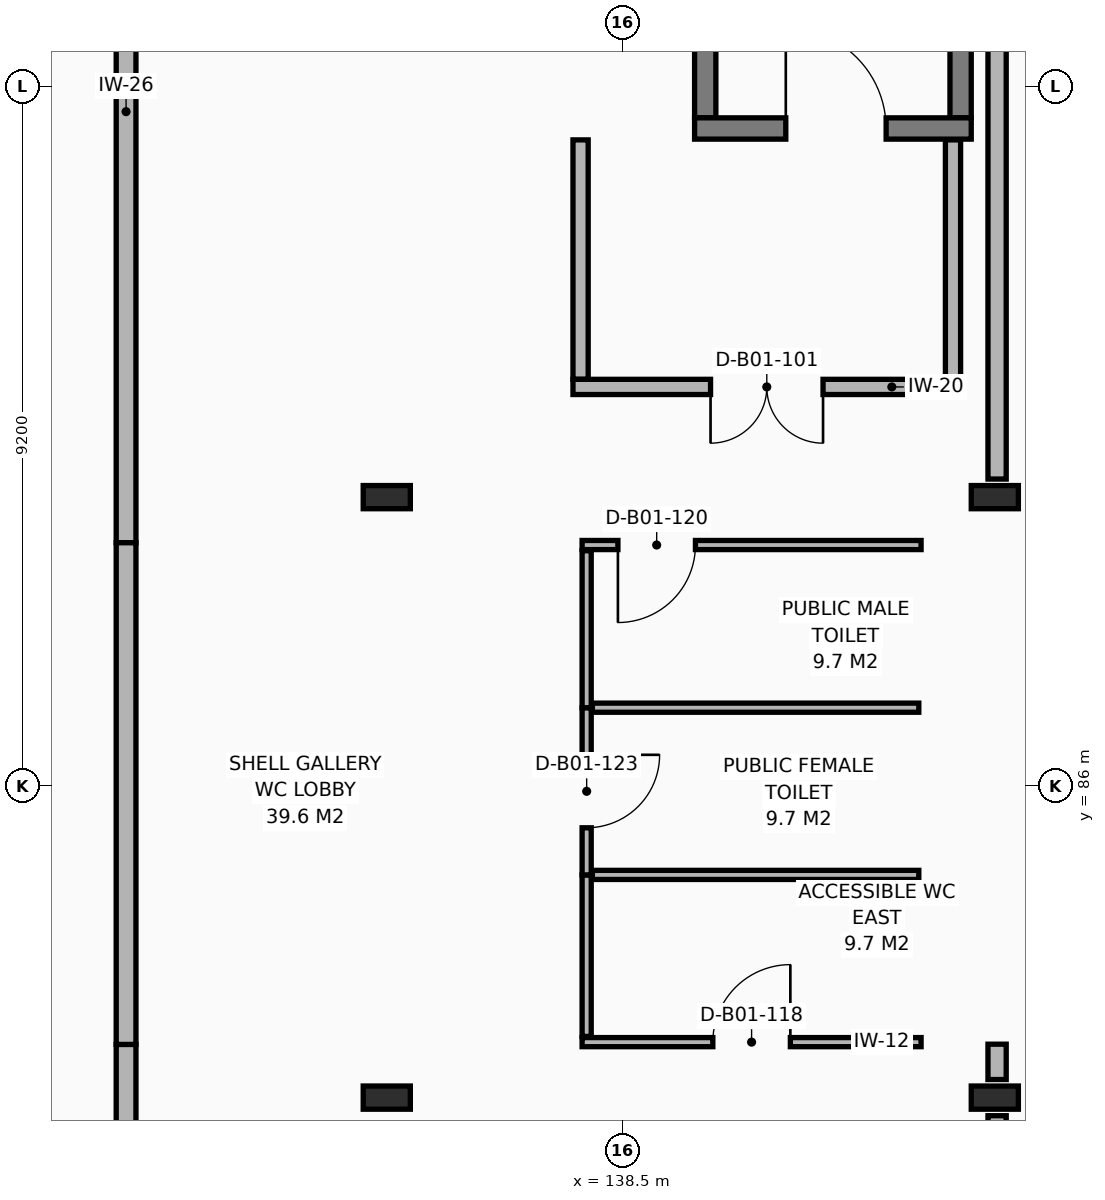
"""IFC4 building model, lengths in metres.
Left out: names, types, materials, properties, quantities, classifications, styles, units other than length and angle.
Written with IfcOpenShell. Run it as: python <this file> out.ifc"""

import sys

from ifc_helpers import new_model, si_unit, direction, frame, frame_2d, origin, origin_2d, place, context, subcontext, project, spatial, rectangle, i_section, extrude, element, fill, save


model = new_model("IFC4")
c1 = context("Model", 3, precision=1e-05, world=origin(), true_north=direction((0.0, 1.0)))
c2 = subcontext(c1, "Body", "Model", "MODEL_VIEW")
j1 = project(units=[si_unit("LENGTHUNIT", "METRE"), si_unit("PLANEANGLEUNIT", "RADIAN")], contexts=[c1])
p1 = place(None, origin())
s1 = spatial("IfcSite", under=j1, at=p1, CompositionType="ELEMENT")
p2 = place(p1, origin())
s2 = spatial("IfcBuilding", under=s1, at=p2, CompositionType="ELEMENT")
p3 = place(p2, frame((0.0, 0.0, -4.8)))
s3 = spatial("IfcBuildingStorey", under=s2, at=p3, CompositionType="ELEMENT", Elevation=-4.8)
for number, where, z_axis, x_axis in (
    (1, (135.4, 81.9, 0.0), (0.0, 0.0, 1.0), (1.0, 0.0, 0.0)),
    (2, (135.4, 89.8, 0.0), (0.0, 0.0, 1.0), (1.0, 0.0, 0.0)),
    (3, (143.4, 81.9, 0.0), (0.0, 0.0, 1.0), (1.0, 0.0, 0.0)),
    (4, (143.4, 89.8, 0.0), (0.0, 0.0, 1.0), (1.0, 0.0, 0.0)),
):
    element("IfcColumn", number, at=place(p3, frame(where, z_axis=z_axis, x_axis=x_axis)), inside=s3, PredefinedType="COLUMN", context=c2, shape_type="SweptSolid", body=[
        extrude(i_section(OverallWidth=0.305, OverallDepth=0.62, WebThickness=0.021, FlangeThickness=0.04, FilletRadius=0.027, at=origin_2d()), origin(), (0.0, 0.0, 1.0), 4.8),
    ])
for number, where, z_axis, x_axis in (
    (5, (142.95, 94.79, 0.0), (0.0, 0.0, 1.0), (0.0, 1.0, 0.0)),
    (6, (139.59, 102.49, 0.0), (0.0, 0.0, 1.0), (0.0, -1.0, 0.0)),
):
    element("IfcWall", number, at=place(p3, frame(where, z_axis=z_axis, x_axis=x_axis)), inside=s3, PredefinedType="SHEAR", context=c2, shape_type="SweptSolid", body=[
        extrude(rectangle(XDim=7.7, YDim=0.28, at=frame_2d((3.85, 0.0))), origin(), (0.0, 0.0, 1.0), 4.55),
    ])
p4 = place(p3, frame((139.45, 94.65, 0.0), z_axis=(0.0, 0.0, 1.0), x_axis=(1.0, 0.0, 0.0)))
e7 = element("IfcWall", 7, at=p4, inside=s3, PredefinedType="SHEAR", context=c2, shape_type="SweptSolid", body=[
    extrude(rectangle(XDim=3.64, YDim=0.28, at=frame_2d((1.82, 0.0))), origin(), (0.0, 0.0, 1.0), 4.55),
])
p5 = place(p4, frame((1.2, 0.0, 0.0)))
e8 = element("IfcOpeningElement", 8, at=p5, cuts=e7, PredefinedType="OPENING", context=c2, shape_type="SweptSolid", body=[
    extrude(rectangle(XDim=1.32, YDim=2.12, at=frame_2d((0.66, 1.06))), frame((0.0, 0.15, 0.0), z_axis=(0.0, -1.0, 0.0), x_axis=(1.0, 0.0, 0.0)), (0.0, 0.0, 1.0), 0.3),
])
for number, where, z_axis, x_axis in (
    (9, (142.85, 91.35, 0.0), (0.0, 0.0, 1.0), (0.0, 1.0, 0.0)),
    (10, (137.95, 94.5, 0.0), (0.0, 0.0, 1.0), (0.0, -1.0, 0.0)),
):
    element("IfcWall", number, at=place(p3, frame(where, z_axis=z_axis, x_axis=x_axis)), inside=s3, PredefinedType="PARTITIONING", context=c2, shape_type="SweptSolid", body=[
        extrude(rectangle(XDim=3.15, YDim=0.2, at=frame_2d((1.575, 0.0))), origin(), (0.0, 0.0, 1.0), 4.55),
    ])
p6 = place(p3, frame((142.95, 91.25, 0.0), z_axis=(0.0, 0.0, 1.0), x_axis=(-1.0, 0.0, 0.0)))
e11 = element("IfcWall", 11, at=p6, inside=s3, PredefinedType="PARTITIONING", context=c2, shape_type="SweptSolid", body=[
    extrude(rectangle(XDim=5.1, YDim=0.2, at=frame_2d((2.55, 0.0))), origin(), (0.0, 0.0, 1.0), 4.55),
])
p7 = place(p6, frame((1.81, 0.0, 0.0)))
e12 = element("IfcOpeningElement", 12, at=p7, cuts=e11, PredefinedType="OPENING", context=c2, shape_type="SweptSolid", body=[
    extrude(rectangle(XDim=1.48, YDim=2.15, at=frame_2d((0.74, 1.075))), frame((0.0, 0.11, 0.0), z_axis=(0.0, -1.0, 0.0), x_axis=(1.0, 0.0, 0.0)), (0.0, 0.0, 1.0), 0.22),
])
p8 = place(p3, frame((137.97, 82.63, 0.0), z_axis=(0.0, 0.0, 1.0), x_axis=(1.0, 0.0, 0.0)))
e13 = element("IfcWall", 13, at=p8, inside=s3, PredefinedType="PARTITIONING", context=c2, shape_type="SweptSolid", body=[
    extrude(rectangle(XDim=4.46, YDim=0.12, at=frame_2d((2.23, 0.0))), origin(), (0.0, 0.0, 1.0), 4.54),
])
p9 = place(p8, frame((1.72, 0.0, 0.0)))
e14 = element("IfcOpeningElement", 14, at=p9, cuts=e13, PredefinedType="OPENING", context=c2, shape_type="SweptSolid", body=[
    extrude(rectangle(XDim=1.02, YDim=2.12, at=frame_2d((0.51, 1.06))), frame((0.0, 0.07, 0.0), z_axis=(0.0, -1.0, 0.0), x_axis=(1.0, 0.0, 0.0)), (0.0, 0.0, 1.0), 0.14),
])
p10 = place(p3, frame((131.97, 73.675, 0.0), z_axis=(0.0, 0.0, 1.0), x_axis=(0.0, 1.0, 0.0)))
e15 = element("IfcWall", 15, at=p10, inside=s3, PredefinedType="PARTITIONING", context=c2, shape_type="SweptSolid", body=[
    extrude(rectangle(XDim=8.925, YDim=0.26, at=frame_2d((4.462, 0.0))), origin(), (0.0, 0.0, 1.0), 3.53),
])
p11 = place(p3, frame((143.43, 81.662, 0.0), z_axis=(0.0, 0.0, 1.0), x_axis=(0.0, -1.0, 0.0)))
e16 = element("IfcWall", 16, at=p11, inside=s3, PredefinedType="PARTITIONING", context=c2, shape_type="SweptSolid", body=[
    extrude(rectangle(XDim=1.132, YDim=0.24, at=frame_2d((0.566, 0.0))), origin(), (0.0, 0.0, 1.0), 3.53),
])
p12 = place(p3, frame((143.43, 82.603, 0.0), z_axis=(0.0, 0.0, 1.0), x_axis=(0.0, -1.0, 0.0)))
e17 = element("IfcWall", 17, at=p12, inside=s3, PredefinedType="PARTITIONING", context=c2, shape_type="SweptSolid", body=[
    extrude(rectangle(XDim=0.465, YDim=0.24, at=frame_2d((0.232, 0.0))), origin(), (0.0, 0.0, 1.0), 3.53),
])
p13 = place(p3, frame((142.43, 89.17, 0.0), z_axis=(0.0, 0.0, 1.0), x_axis=(-1.0, 0.0, 0.0)))
e18 = element("IfcWall", 18, at=p13, inside=s3, PredefinedType="PARTITIONING", context=c2, shape_type="SweptSolid", body=[
    extrude(rectangle(XDim=4.46, YDim=0.12, at=frame_2d((2.23, 0.0))), origin(), (0.0, 0.0, 1.0), 4.54),
])
p14 = place(p13, frame((2.969, 0.0, 0.0)))
e19 = element("IfcOpeningElement", 19, at=p14, cuts=e18, PredefinedType="OPENING", context=c2, shape_type="SweptSolid", body=[
    extrude(rectangle(XDim=1.02, YDim=2.12, at=frame_2d((0.51, 1.06))), frame((0.0, 0.07, 0.0), z_axis=(0.0, -1.0, 0.0), x_axis=(1.0, 0.0, 0.0)), (0.0, 0.0, 1.0), 0.14),
])
p15 = place(p3, frame((131.97, 89.2, 0.0), z_axis=(0.0, 0.0, 1.0), x_axis=(0.0, 1.0, 0.0)))
e20 = element("IfcWall", 20, at=p15, inside=s3, PredefinedType="PARTITIONING", context=c2, shape_type="SweptSolid", body=[
    extrude(rectangle(XDim=23.836, YDim=0.26, at=frame_2d((11.918, 0.0))), origin(), (0.0, 0.0, 1.0), 3.53),
])
p16 = place(p15, frame((11.343, 0.0, 0.0)))
e21 = element("IfcOpeningElement", 21, at=p16, cuts=e20, PredefinedType="OPENING", context=c2, shape_type="SweptSolid", body=[
    extrude(rectangle(XDim=1.15, YDim=2.15, at=frame_2d((0.575, 1.075))), frame((0.0, 0.14, 0.0), z_axis=(0.0, -1.0, 0.0), x_axis=(1.0, 0.0, 0.0)), (0.0, 0.0, 1.0), 0.28),
])
p17 = place(p3, frame((143.43, 96.53, 0.0), z_axis=(0.0, 0.0, 1.0), x_axis=(0.0, -1.0, 0.0)))
e22 = element("IfcWall", 22, at=p17, inside=s3, PredefinedType="PARTITIONING", context=c2, shape_type="SweptSolid", body=[
    extrude(rectangle(XDim=6.492, YDim=0.24, at=frame_2d((3.246, 0.0))), origin(), (0.0, 0.0, 1.0), 3.53),
])
p18 = place(p3, frame((138.03, 84.83, 0.0), z_axis=(0.0, 0.0, 1.0), x_axis=(0.0, -1.0, 0.0)))
e23 = element("IfcWall", 23, at=p18, inside=s3, PredefinedType="PARTITIONING", context=c2, shape_type="SweptSolid", body=[
    extrude(rectangle(XDim=2.125, YDim=0.12, at=frame_2d((1.062, 0.0))), origin(), (0.0, 0.0, 1.0), 4.54),
])
p19 = place(p3, frame((138.03, 87.03, 0.0), z_axis=(0.0, 0.0, 1.0), x_axis=(0.0, -1.0, 0.0)))
e24 = element("IfcWall", 24, at=p19, inside=s3, PredefinedType="PARTITIONING", context=c2, shape_type="SweptSolid", body=[
    extrude(rectangle(XDim=2.2, YDim=0.12, at=frame_2d((1.1, 0.0))), origin(), (0.0, 0.0, 1.0), 4.54),
])
p20 = place(p19, frame((0.62, 0.0, 0.0)))
e25 = element("IfcOpeningElement", 25, at=p20, cuts=e24, PredefinedType="OPENING", context=c2, shape_type="SweptSolid", body=[
    extrude(rectangle(XDim=0.96, YDim=2.1, at=frame_2d((0.48, 1.05))), frame((0.0, 0.07, 0.0), z_axis=(0.0, -1.0, 0.0), x_axis=(1.0, 0.0, 0.0)), (0.0, 0.0, 1.0), 0.14),
])
p21 = place(p3, frame((138.03, 89.095, 0.0), z_axis=(0.0, 0.0, 1.0), x_axis=(0.0, -1.0, 0.0)))
e26 = element("IfcWall", 26, at=p21, inside=s3, PredefinedType="PARTITIONING", context=c2, shape_type="SweptSolid", body=[
    extrude(rectangle(XDim=2.065, YDim=0.12, at=frame_2d((1.032, 0.0))), origin(), (0.0, 0.0, 1.0), 4.54),
])
p22 = place(p3, frame((131.97, 82.6, 0.0), z_axis=(0.0, 0.0, 1.0), x_axis=(0.0, 1.0, 0.0)))
e27 = element("IfcWall", 27, at=p22, inside=s3, PredefinedType="PARTITIONING", context=c2, shape_type="SweptSolid", body=[
    extrude(rectangle(XDim=6.6, YDim=0.26, at=frame_2d((3.3, 0.0))), origin(), (0.0, 0.0, 1.0), 3.98),
])
for number, where, z_axis, x_axis in (
    (28, (138.105, 84.83, 0.0), (0.0, 0.0, 1.0), (1.0, 0.0, 0.0)),
    (29, (138.105, 87.03, 0.0), (0.0, 0.0, 1.0), (1.0, 0.0, 0.0)),
):
    element("IfcWall", number, at=place(p3, frame(where, z_axis=z_axis, x_axis=x_axis)), inside=s3, PredefinedType="PARTITIONING", context=c2, shape_type="SweptSolid", body=[
        extrude(rectangle(XDim=4.295, YDim=0.12, at=frame_2d((2.147, 0.0))), origin(), (0.0, 0.0, 1.0), 4.54),
    ])
p23 = place(p5, origin())
e30 = element("IfcDoor", 30, at=p23, inside=s3, OperationType="SINGLE_SWING_LEFT", PredefinedType="DOOR", context=c2, shape_type="SweptSolid", body=[
    extrude(rectangle(XDim=1.32, YDim=2.12, at=frame_2d((0.66, 1.06))), frame((0.0, 0.025, 0.0), z_axis=(0.0, -1.0, 0.0), x_axis=(1.0, 0.0, 0.0)), (0.0, 0.0, 1.0), 0.05),
])
fill(e8, e30)
p24 = place(p7, origin())
e31 = element("IfcDoor", 31, at=p24, inside=s3, OperationType="DOUBLE_DOOR_SINGLE_SWING", PredefinedType="DOOR", context=c2, shape_type="SweptSolid", body=[
    extrude(rectangle(XDim=1.48, YDim=2.15, at=frame_2d((0.74, 1.075))), frame((0.0, 0.025, 0.0), z_axis=(0.0, -1.0, 0.0), x_axis=(1.0, 0.0, 0.0)), (0.0, 0.0, 1.0), 0.05),
])
fill(e12, e31)
p25 = place(p9, origin())
e32 = element("IfcDoor", 32, at=p25, inside=s3, OperationType="SINGLE_SWING_RIGHT", PredefinedType="DOOR", context=c2, shape_type="SweptSolid", body=[
    extrude(rectangle(XDim=1.02, YDim=2.12, at=frame_2d((0.51, 1.06))), frame((0.0, 0.025, 0.0), z_axis=(0.0, -1.0, 0.0), x_axis=(1.0, 0.0, 0.0)), (0.0, 0.0, 1.0), 0.05),
])
fill(e14, e32)
p26 = place(p14, origin())
e33 = element("IfcDoor", 33, at=p26, inside=s3, OperationType="SINGLE_SWING_RIGHT", PredefinedType="DOOR", context=c2, shape_type="SweptSolid", body=[
    extrude(rectangle(XDim=1.02, YDim=2.12, at=frame_2d((0.51, 1.06))), frame((0.0, 0.025, 0.0), z_axis=(0.0, -1.0, 0.0), x_axis=(1.0, 0.0, 0.0)), (0.0, 0.0, 1.0), 0.05),
])
fill(e19, e33)
p27 = place(p20, origin())
e34 = element("IfcDoor", 34, at=p27, inside=s3, OperationType="SINGLE_SWING_LEFT", PredefinedType="DOOR", context=c2, shape_type="SweptSolid", body=[
    extrude(rectangle(XDim=0.96, YDim=2.1, at=frame_2d((0.48, 1.05))), frame((0.0, 0.025, 0.0), z_axis=(0.0, -1.0, 0.0), x_axis=(1.0, 0.0, 0.0)), (0.0, 0.0, 1.0), 0.05),
])
fill(e25, e34)
save(model, sys.argv[1])
